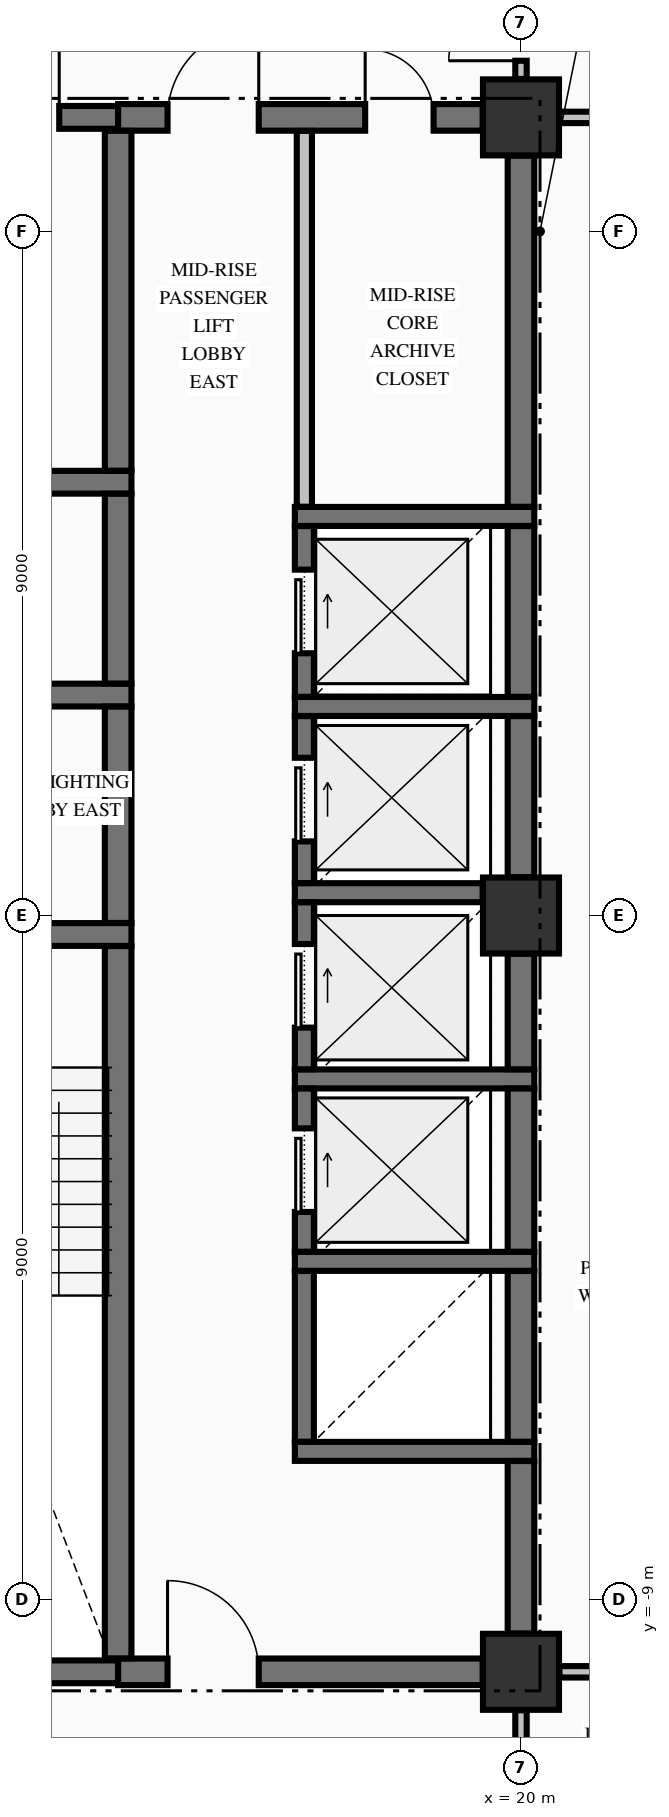
"""IFC4 building model, lengths in metres.
Left out: names, types, materials, properties, quantities, classifications, styles, units other than length and angle.
Written with IfcOpenShell. Run it as: python <this file> out.ifc"""

import sys

from ifc_helpers import new_model, si_unit, direction, frame, frame_2d, origin, origin_2d, place, context, subcontext, project, spatial, rectangle, extrude, element, fill, save


model = new_model("IFC4")
c1 = context("Model", 3, precision=1e-05, world=origin(), true_north=direction((0.0, 1.0)))
c2 = subcontext(c1, "Body", "Model", "MODEL_VIEW")
j1 = project(units=[si_unit("LENGTHUNIT", "METRE"), si_unit("PLANEANGLEUNIT", "RADIAN")], contexts=[c1])
p1 = place(None, origin())
s1 = spatial("IfcSite", under=j1, at=p1, CompositionType="ELEMENT")
p2 = place(p1, origin())
s2 = spatial("IfcBuilding", under=s1, at=p2, CompositionType="ELEMENT")
p3 = place(p2, frame((0.0, 0.0, 149.91)))
s3 = spatial("IfcBuildingStorey", under=s2, at=p3, CompositionType="ELEMENT", Elevation=149.91)
for number, where, z_axis, x_axis in (
    (1, (20.0, -9.95, -0.25), (0.0, 0.0, 1.0), (1.0, 0.0, 0.0)),
    (2, (20.0, 10.5, -0.25), (0.0, 0.0, 1.0), (1.0, 0.0, 0.0)),
    (3, (20.0, 0.0, -0.25), (0.0, 0.0, 1.0), (1.0, 0.0, 0.0)),
):
    element("IfcColumn", number, at=place(p3, frame(where, z_axis=z_axis, x_axis=x_axis)), inside=s3, PredefinedType="COLUMN", context=c2, shape_type="SweptSolid", body=[
        extrude(rectangle(XDim=1.0, YDim=1.0, at=origin_2d()), origin(), (0.0, 0.0, 1.0), 3.395),
    ])
p4 = place(p3, frame((11.504, -9.95, 0.0), z_axis=(0.0, 0.0, 1.0), x_axis=(1.0, 0.0, 0.0)))
e4 = element("IfcWall", 4, at=p4, inside=s3, PredefinedType="SHEAR", context=c2, shape_type="SweptSolid", body=[
    extrude(rectangle(XDim=3.196, YDim=0.3, at=frame_2d((1.598, 0.0))), origin(), (0.0, 0.0, 1.0), 3.145),
])
p5 = place(p3, frame((14.7, -9.95, 0.0), z_axis=(0.0, 0.0, 1.0), x_axis=(1.0, 0.0, 0.0)))
e5 = element("IfcWall", 5, at=p5, inside=s3, PredefinedType="SHEAR", context=c2, shape_type="SweptSolid", body=[
    extrude(rectangle(XDim=4.796, YDim=0.35, at=frame_2d((2.398, 0.0))), origin(), (0.0, 0.0, 1.0), 3.145),
])
p6 = place(p5, frame((0.65, 0.0, 0.0)))
e6 = element("IfcOpeningElement", 6, at=p6, cuts=e5, PredefinedType="OPENING", context=c2, shape_type="SweptSolid", body=[
    extrude(rectangle(XDim=1.2, YDim=2.15, at=frame_2d((0.6, 1.075))), frame((0.0, 0.185, 0.0), z_axis=(0.0, -1.0, 0.0), x_axis=(1.0, 0.0, 0.0)), (0.0, 0.0, 1.0), 0.37),
])
for number, where, z_axis, x_axis in (
    (7, (17.025, -7.05, 0.0), (0.0, 0.0, 1.0), (1.0, 0.0, 0.0)),
    (8, (17.025, -4.55, 0.0), (0.0, 0.0, 1.0), (1.0, 0.0, 0.0)),
    (9, (17.025, -2.15, 0.0), (0.0, 0.0, 1.0), (1.0, 0.0, 0.0)),
):
    element("IfcWall", number, at=place(p3, frame(where, z_axis=z_axis, x_axis=x_axis)), inside=s3, PredefinedType="SOLIDWALL", context=c2, shape_type="SweptSolid", body=[
        extrude(rectangle(XDim=3.15, YDim=0.25, at=frame_2d((1.575, 0.0))), origin(), (0.0, 0.0, 1.0), 3.145),
    ])
p7 = place(p3, frame((11.504, -0.25, 0.0), z_axis=(0.0, 0.0, 1.0), x_axis=(1.0, 0.0, 0.0)))
e10 = element("IfcWall", 10, at=p7, inside=s3, PredefinedType="SHEAR", context=c2, shape_type="SweptSolid", body=[
    extrude(rectangle(XDim=3.371, YDim=0.3, at=frame_2d((1.686, 0.0))), origin(), (0.0, 0.0, 1.0), 3.145),
])
p8 = place(p7, frame((1.096, 0.0, 0.0)))
e11 = element("IfcOpeningElement", 11, at=p8, cuts=e10, PredefinedType="OPENING", context=c2, shape_type="SweptSolid", body=[
    extrude(rectangle(XDim=1.1, YDim=2.15, at=frame_2d((0.55, 1.075))), frame((0.0, 0.16, 0.0), z_axis=(0.0, -1.0, 0.0), x_axis=(1.0, 0.0, 0.0)), (0.0, 0.0, 1.0), 0.32),
])
p9 = place(p3, frame((17.025, 0.3, 0.0), z_axis=(0.0, 0.0, 1.0), x_axis=(1.0, 0.0, 0.0)))
e12 = element("IfcWall", 12, at=p9, inside=s3, PredefinedType="SOLIDWALL", context=c2, shape_type="SweptSolid", body=[
    extrude(rectangle(XDim=2.471, YDim=0.25, at=frame_2d((1.236, 0.0))), origin(), (0.0, 0.0, 1.0), 3.145),
])
p10 = place(p3, frame((17.025, 2.75, 0.0), z_axis=(0.0, 0.0, 1.0), x_axis=(1.0, 0.0, 0.0)))
e13 = element("IfcWall", 13, at=p10, inside=s3, PredefinedType="SOLIDWALL", context=c2, shape_type="SweptSolid", body=[
    extrude(rectangle(XDim=3.15, YDim=0.25, at=frame_2d((1.575, 0.0))), origin(), (0.0, 0.0, 1.0), 3.145),
])
p11 = place(p3, frame((10.85, 2.9, 0.0), z_axis=(0.0, 0.0, 1.0), x_axis=(1.0, 0.0, 0.0)))
e14 = element("IfcWall", 14, at=p11, inside=s3, PredefinedType="SHEAR", context=c2, shape_type="SweptSolid", body=[
    extrude(rectangle(XDim=4.025, YDim=0.3, at=frame_2d((2.012, 0.0))), origin(), (0.0, 0.0, 1.0), 3.145),
])
p12 = place(p11, frame((0.85, 0.0, 0.0)))
e15 = element("IfcOpeningElement", 15, at=p12, cuts=e14, PredefinedType="OPENING", context=c2, shape_type="SweptSolid", body=[
    extrude(rectangle(XDim=1.1, YDim=2.2, at=frame_2d((0.55, 1.1))), frame((0.0, 0.16, 0.0), z_axis=(0.0, -1.0, 0.0), x_axis=(1.0, 0.0, 0.0)), (0.0, 0.0, 1.0), 0.32),
])
p13 = place(p3, frame((17.025, 5.25, 0.0), z_axis=(0.0, 0.0, 1.0), x_axis=(1.0, 0.0, 0.0)))
e16 = element("IfcWall", 16, at=p13, inside=s3, PredefinedType="SOLIDWALL", context=c2, shape_type="SweptSolid", body=[
    extrude(rectangle(XDim=3.15, YDim=0.25, at=frame_2d((1.575, 0.0))), origin(), (0.0, 0.0, 1.0), 3.145),
])
p14 = place(p3, frame((10.85, 5.7, 0.0), z_axis=(0.0, 0.0, 1.0), x_axis=(1.0, 0.0, 0.0)))
e17 = element("IfcWall", 17, at=p14, inside=s3, PredefinedType="SHEAR", context=c2, shape_type="SweptSolid", body=[
    extrude(rectangle(XDim=4.025, YDim=0.3, at=frame_2d((2.012, 0.0))), origin(), (0.0, 0.0, 1.0), 3.145),
])
p15 = place(p3, frame((11.504, 10.5, 0.0), z_axis=(0.0, 0.0, 1.0), x_axis=(1.0, 0.0, 0.0)))
e18 = element("IfcWall", 18, at=p15, inside=s3, PredefinedType="SHEAR", context=c2, shape_type="SweptSolid", body=[
    extrude(rectangle(XDim=3.196, YDim=0.3, at=frame_2d((1.598, 0.0))), origin(), (0.0, 0.0, 1.0), 3.145),
])
p16 = place(p15, frame((1.471, 0.0, 0.0)))
e19 = element("IfcOpeningElement", 19, at=p16, cuts=e18, PredefinedType="OPENING", context=c2, shape_type="SweptSolid", body=[
    extrude(rectangle(XDim=0.95, YDim=2.15, at=frame_2d((0.475, 1.075))), frame((0.0, 0.16, 0.0), z_axis=(0.0, -1.0, 0.0), x_axis=(1.0, 0.0, 0.0)), (0.0, 0.0, 1.0), 0.32),
])
p17 = place(p3, frame((14.7, 10.5, 0.0), z_axis=(0.0, 0.0, 1.0), x_axis=(1.0, 0.0, 0.0)))
e20 = element("IfcWall", 20, at=p17, inside=s3, PredefinedType="SHEAR", context=c2, shape_type="SweptSolid", body=[
    extrude(rectangle(XDim=4.796, YDim=0.35, at=frame_2d((2.398, 0.0))), origin(), (0.0, 0.0, 1.0), 3.145),
])
p18 = place(p17, frame((0.65, 0.0, 0.0)))
e21 = element("IfcOpeningElement", 21, at=p18, cuts=e20, PredefinedType="OPENING", context=c2, shape_type="SweptSolid", body=[
    extrude(rectangle(XDim=1.2, YDim=2.15, at=frame_2d((0.6, 1.075))), frame((0.0, 0.185, 0.0), z_axis=(0.0, -1.0, 0.0), x_axis=(1.0, 0.0, 0.0)), (0.0, 0.0, 1.0), 0.37),
])
p19 = place(p17, frame((3.25, 0.0, 0.0)))
e22 = element("IfcOpeningElement", 22, at=p19, cuts=e20, PredefinedType="OPENING", context=c2, shape_type="SweptSolid", body=[
    extrude(rectangle(XDim=0.9, YDim=2.15, at=frame_2d((0.45, 1.075))), frame((0.0, 0.185, 0.0), z_axis=(0.0, -1.0, 0.0), x_axis=(1.0, 0.0, 0.0)), (0.0, 0.0, 1.0), 0.37),
])
p20 = place(p3, frame((20.506, -9.95, 0.0), z_axis=(0.0, 0.0, 1.0), x_axis=(1.0, 0.0, 0.0)))
e23 = element("IfcWall", 23, at=p20, inside=s3, PredefinedType="PARTITIONING", context=c2, shape_type="SweptSolid", body=[
    extrude(rectangle(XDim=2.329, YDim=0.15, at=frame_2d((1.165, 0.0))), origin(), (0.0, 0.0, 1.0), 3.145),
])
p21 = place(p20, frame((0.494, 0.0, 0.0)))
e24 = element("IfcOpeningElement", 24, at=p21, cuts=e23, PredefinedType="OPENING", context=c2, shape_type="SweptSolid", body=[
    extrude(rectangle(XDim=1.0, YDim=2.15, at=frame_2d((0.5, 1.075))), frame((0.0, 0.085, 0.0), z_axis=(0.0, -1.0, 0.0), x_axis=(1.0, 0.0, 0.0)), (0.0, 0.0, 1.0), 0.17),
])
p22 = place(p3, frame((20.506, 10.5, 0.0), z_axis=(0.0, 0.0, 1.0), x_axis=(1.0, 0.0, 0.0)))
e25 = element("IfcWall", 25, at=p22, inside=s3, PredefinedType="PARTITIONING", context=c2, shape_type="SweptSolid", body=[
    extrude(rectangle(XDim=2.329, YDim=0.15, at=frame_2d((1.165, 0.0))), origin(), (0.0, 0.0, 1.0), 3.145),
])
p23 = place(p22, frame((0.494, 0.0, 0.0)))
e26 = element("IfcOpeningElement", 26, at=p23, cuts=e25, PredefinedType="OPENING", context=c2, shape_type="SweptSolid", body=[
    extrude(rectangle(XDim=1.0, YDim=2.15, at=frame_2d((0.5, 1.075))), frame((0.0, 0.085, 0.0), z_axis=(0.0, -1.0, 0.0), x_axis=(1.0, 0.0, 0.0)), (0.0, 0.0, 1.0), 0.17),
])
p24 = place(p3, frame((14.7, -9.773, 0.0), z_axis=(0.0, 0.0, 1.0), x_axis=(0.0, 1.0, 0.0)))
e27 = element("IfcWall", 27, at=p24, inside=s3, PredefinedType="SHEAR", context=c2, shape_type="SweptSolid", body=[
    extrude(rectangle(XDim=9.371, YDim=0.35, at=frame_2d((4.686, 0.0))), origin(), (0.0, 0.0, 1.0), 3.145),
])
p25 = place(p3, frame((14.7, -0.098, 0.0), z_axis=(0.0, 0.0, 1.0), x_axis=(0.0, 1.0, 0.0)))
e28 = element("IfcWall", 28, at=p25, inside=s3, PredefinedType="SHEAR", context=c2, shape_type="SweptSolid", body=[
    extrude(rectangle(XDim=2.846, YDim=0.35, at=frame_2d((1.423, 0.0))), origin(), (0.0, 0.0, 1.0), 3.145),
])
p26 = place(p3, frame((14.7, 3.052, 0.0), z_axis=(0.0, 0.0, 1.0), x_axis=(0.0, 1.0, 0.0)))
e29 = element("IfcWall", 29, at=p26, inside=s3, PredefinedType="SHEAR", context=c2, shape_type="SweptSolid", body=[
    extrude(rectangle(XDim=2.496, YDim=0.35, at=frame_2d((1.248, 0.0))), origin(), (0.0, 0.0, 1.0), 3.145),
])
p27 = place(p3, frame((14.7, 5.852, 0.0), z_axis=(0.0, 0.0, 1.0), x_axis=(0.0, 1.0, 0.0)))
e30 = element("IfcWall", 30, at=p27, inside=s3, PredefinedType="SHEAR", context=c2, shape_type="SweptSolid", body=[
    extrude(rectangle(XDim=4.471, YDim=0.35, at=frame_2d((2.235, 0.0))), origin(), (0.0, 0.0, 1.0), 3.145),
])
p28 = place(p3, frame((17.15, -6.923, 0.0), z_axis=(0.0, 0.0, 1.0), x_axis=(0.0, 1.0, 0.0)))
e31 = element("IfcWall", 31, at=p28, inside=s3, PredefinedType="SOLIDWALL", context=c2, shape_type="SweptSolid", body=[
    extrude(rectangle(XDim=2.246, YDim=0.25, at=frame_2d((1.123, 0.0))), origin(), (0.0, 0.0, 1.0), 3.145),
])
p29 = place(p3, frame((17.15, -4.423, 0.0), z_axis=(0.0, 0.0, 1.0), x_axis=(0.0, 1.0, 0.0)))
e32 = element("IfcWall", 32, at=p29, inside=s3, PredefinedType="SOLIDWALL", context=c2, shape_type="SweptSolid", body=[
    extrude(rectangle(XDim=2.146, YDim=0.25, at=frame_2d((1.073, 0.0))), origin(), (0.0, 0.0, 1.0), 3.145),
])
p30 = place(p29, frame((0.523, 0.0, 0.0)))
e33 = element("IfcOpeningElement", 33, at=p30, cuts=e32, PredefinedType="OPENING", context=c2, shape_type="SweptSolid", body=[
    extrude(rectangle(XDim=1.1, YDim=2.2, at=frame_2d((0.55, 1.1))), frame((0.0, 0.135, 0.0), z_axis=(0.0, -1.0, 0.0), x_axis=(1.0, 0.0, 0.0)), (0.0, 0.0, 1.0), 0.27),
])
p31 = place(p3, frame((17.15, -2.023, 0.0), z_axis=(0.0, 0.0, 1.0), x_axis=(0.0, 1.0, 0.0)))
e34 = element("IfcWall", 34, at=p31, inside=s3, PredefinedType="SOLIDWALL", context=c2, shape_type="SweptSolid", body=[
    extrude(rectangle(XDim=2.196, YDim=0.25, at=frame_2d((1.098, 0.0))), origin(), (0.0, 0.0, 1.0), 3.145),
])
p32 = place(p31, frame((0.548, 0.0, 0.0)))
e35 = element("IfcOpeningElement", 35, at=p32, cuts=e34, PredefinedType="OPENING", context=c2, shape_type="SweptSolid", body=[
    extrude(rectangle(XDim=1.1, YDim=2.2, at=frame_2d((0.55, 1.1))), frame((0.0, 0.135, 0.0), z_axis=(0.0, -1.0, 0.0), x_axis=(1.0, 0.0, 0.0)), (0.0, 0.0, 1.0), 0.27),
])
p33 = place(p3, frame((17.15, 0.427, 0.0), z_axis=(0.0, 0.0, 1.0), x_axis=(0.0, 1.0, 0.0)))
e36 = element("IfcWall", 36, at=p33, inside=s3, PredefinedType="SOLIDWALL", context=c2, shape_type="SweptSolid", body=[
    extrude(rectangle(XDim=2.196, YDim=0.25, at=frame_2d((1.098, 0.0))), origin(), (0.0, 0.0, 1.0), 3.145),
])
p34 = place(p33, frame((0.548, 0.0, 0.0)))
e37 = element("IfcOpeningElement", 37, at=p34, cuts=e36, PredefinedType="OPENING", context=c2, shape_type="SweptSolid", body=[
    extrude(rectangle(XDim=1.1, YDim=2.2, at=frame_2d((0.55, 1.1))), frame((0.0, 0.135, 0.0), z_axis=(0.0, -1.0, 0.0), x_axis=(1.0, 0.0, 0.0)), (0.0, 0.0, 1.0), 0.27),
])
p35 = place(p3, frame((17.15, 2.877, 0.0), z_axis=(0.0, 0.0, 1.0), x_axis=(0.0, 1.0, 0.0)))
e38 = element("IfcWall", 38, at=p35, inside=s3, PredefinedType="SOLIDWALL", context=c2, shape_type="SweptSolid", body=[
    extrude(rectangle(XDim=2.246, YDim=0.25, at=frame_2d((1.123, 0.0))), origin(), (0.0, 0.0, 1.0), 3.145),
])
p36 = place(p35, frame((0.573, 0.0, 0.0)))
e39 = element("IfcOpeningElement", 39, at=p36, cuts=e38, PredefinedType="OPENING", context=c2, shape_type="SweptSolid", body=[
    extrude(rectangle(XDim=1.1, YDim=2.2, at=frame_2d((0.55, 1.1))), frame((0.0, 0.135, 0.0), z_axis=(0.0, -1.0, 0.0), x_axis=(1.0, 0.0, 0.0)), (0.0, 0.0, 1.0), 0.27),
])
p37 = place(p3, frame((20.0, -9.446, 0.0), z_axis=(0.0, 0.0, 1.0), x_axis=(0.0, 1.0, 0.0)))
e40 = element("IfcWall", 40, at=p37, inside=s3, PredefinedType="SHEAR", context=c2, shape_type="SweptSolid", body=[
    extrude(rectangle(XDim=2.269, YDim=0.35, at=frame_2d((1.135, 0.0))), origin(), (0.0, 0.0, 1.0), 3.145),
])
p38 = place(p3, frame((20.0, -6.923, 0.0), z_axis=(0.0, 0.0, 1.0), x_axis=(0.0, 1.0, 0.0)))
e41 = element("IfcWall", 41, at=p38, inside=s3, PredefinedType="SHEAR", context=c2, shape_type="SweptSolid", body=[
    extrude(rectangle(XDim=2.246, YDim=0.35, at=frame_2d((1.123, 0.0))), origin(), (0.0, 0.0, 1.0), 3.145),
])
p39 = place(p3, frame((20.0, -4.423, 0.0), z_axis=(0.0, 0.0, 1.0), x_axis=(0.0, 1.0, 0.0)))
e42 = element("IfcWall", 42, at=p39, inside=s3, PredefinedType="SHEAR", context=c2, shape_type="SweptSolid", body=[
    extrude(rectangle(XDim=2.146, YDim=0.35, at=frame_2d((1.073, 0.0))), origin(), (0.0, 0.0, 1.0), 3.145),
])
p40 = place(p3, frame((20.0, -2.023, 0.0), z_axis=(0.0, 0.0, 1.0), x_axis=(0.0, 1.0, 0.0)))
e43 = element("IfcWall", 43, at=p40, inside=s3, PredefinedType="SHEAR", context=c2, shape_type="SweptSolid", body=[
    extrude(rectangle(XDim=1.519, YDim=0.35, at=frame_2d((0.76, 0.0))), origin(), (0.0, 0.0, 1.0), 3.145),
])
p41 = place(p3, frame((20.0, 0.504, 0.0), z_axis=(0.0, 0.0, 1.0), x_axis=(0.0, 1.0, 0.0)))
e44 = element("IfcWall", 44, at=p41, inside=s3, PredefinedType="SHEAR", context=c2, shape_type="SweptSolid", body=[
    extrude(rectangle(XDim=2.119, YDim=0.35, at=frame_2d((1.06, 0.0))), origin(), (0.0, 0.0, 1.0), 3.145),
])
p42 = place(p3, frame((20.0, 2.877, 0.0), z_axis=(0.0, 0.0, 1.0), x_axis=(0.0, 1.0, 0.0)))
e45 = element("IfcWall", 45, at=p42, inside=s3, PredefinedType="SHEAR", context=c2, shape_type="SweptSolid", body=[
    extrude(rectangle(XDim=2.246, YDim=0.35, at=frame_2d((1.123, 0.0))), origin(), (0.0, 0.0, 1.0), 3.145),
])
p43 = place(p3, frame((20.0, 5.377, 0.0), z_axis=(0.0, 0.0, 1.0), x_axis=(0.0, 1.0, 0.0)))
e46 = element("IfcWall", 46, at=p43, inside=s3, PredefinedType="SHEAR", context=c2, shape_type="SweptSolid", body=[
    extrude(rectangle(XDim=4.619, YDim=0.35, at=frame_2d((2.31, 0.0))), origin(), (0.0, 0.0, 1.0), 3.145),
])
p44 = place(p3, frame((17.15, 5.378, 0.0), z_axis=(0.0, 0.0, 1.0), x_axis=(0.0, 1.0, 0.0)))
e47 = element("IfcWall", 47, at=p44, inside=s3, PredefinedType="PARTITIONING", context=c2, shape_type="SweptSolid", body=[
    extrude(rectangle(XDim=4.944, YDim=0.2, at=frame_2d((2.472, 0.0))), origin(), (0.0, 0.0, 1.0), 3.145),
])
p45 = place(p3, frame((20.0, -13.022, 0.0), z_axis=(0.0, 0.0, 1.0), x_axis=(0.0, 1.0, 0.0)))
e48 = element("IfcWall", 48, at=p45, inside=s3, PredefinedType="PARTITIONING", context=c2, shape_type="SweptSolid", body=[
    extrude(rectangle(XDim=2.566, YDim=0.15, at=frame_2d((1.283, 0.0))), origin(), (0.0, 0.0, 1.0), 2.635),
])
p46 = place(p45, frame((1.027, 0.0, 0.0)))
e49 = element("IfcOpeningElement", 49, at=p46, cuts=e48, PredefinedType="OPENING", context=c2, shape_type="SweptSolid", body=[
    extrude(rectangle(XDim=0.95, YDim=2.15, at=frame_2d((0.475, 1.075))), frame((0.0, 0.085, 0.0), z_axis=(0.0, -1.0, 0.0), x_axis=(1.0, 0.0, 0.0)), (0.0, 0.0, 1.0), 0.17),
])
p47 = place(p3, frame((20.0, 11.006, 0.0), z_axis=(0.0, 0.0, 1.0), x_axis=(0.0, 1.0, 0.0)))
e50 = element("IfcWall", 50, at=p47, inside=s3, PredefinedType="PARTITIONING", context=c2, shape_type="SweptSolid", body=[
    extrude(rectangle(XDim=1.866, YDim=0.15, at=frame_2d((0.933, 0.0))), origin(), (0.0, 0.0, 1.0), 2.635),
])
p48 = place(p47, frame((0.239, 0.0, 0.0)))
e51 = element("IfcOpeningElement", 51, at=p48, cuts=e50, PredefinedType="OPENING", context=c2, shape_type="SweptSolid", body=[
    extrude(rectangle(XDim=0.95, YDim=2.15, at=frame_2d((0.475, 1.075))), frame((0.0, 0.085, 0.0), z_axis=(0.0, -1.0, 0.0), x_axis=(1.0, 0.0, 0.0)), (0.0, 0.0, 1.0), 0.17),
])
p49 = place(p16, origin())
e52 = element("IfcDoor", 52, at=p49, inside=s3, OperationType="SINGLE_SWING_RIGHT", PredefinedType="DOOR", context=c2, shape_type="SweptSolid", body=[
    extrude(rectangle(XDim=0.95, YDim=2.15, at=frame_2d((0.475, 1.075))), frame((0.0, 0.025, 0.0), z_axis=(0.0, -1.0, 0.0), x_axis=(1.0, 0.0, 0.0)), (0.0, 0.0, 1.0), 0.05),
])
fill(e19, e52)
p50 = place(p30, origin())
e53 = element("IfcDoor", 53, at=p50, inside=s3, OperationType="SLIDING_TO_RIGHT", PredefinedType="DOOR", context=c2, shape_type="SweptSolid", body=[
    extrude(rectangle(XDim=1.1, YDim=2.2, at=frame_2d((0.55, 1.1))), frame((0.0, 0.025, 0.0), z_axis=(0.0, -1.0, 0.0), x_axis=(1.0, 0.0, 0.0)), (0.0, 0.0, 1.0), 0.05),
])
fill(e33, e53)
p51 = place(p32, origin())
e54 = element("IfcDoor", 54, at=p51, inside=s3, OperationType="SLIDING_TO_RIGHT", PredefinedType="DOOR", context=c2, shape_type="SweptSolid", body=[
    extrude(rectangle(XDim=1.1, YDim=2.2, at=frame_2d((0.55, 1.1))), frame((0.0, 0.025, 0.0), z_axis=(0.0, -1.0, 0.0), x_axis=(1.0, 0.0, 0.0)), (0.0, 0.0, 1.0), 0.05),
])
fill(e35, e54)
p52 = place(p34, origin())
e55 = element("IfcDoor", 55, at=p52, inside=s3, OperationType="SLIDING_TO_RIGHT", PredefinedType="DOOR", context=c2, shape_type="SweptSolid", body=[
    extrude(rectangle(XDim=1.1, YDim=2.2, at=frame_2d((0.55, 1.1))), frame((0.0, 0.025, 0.0), z_axis=(0.0, -1.0, 0.0), x_axis=(1.0, 0.0, 0.0)), (0.0, 0.0, 1.0), 0.05),
])
fill(e37, e55)
p53 = place(p36, origin())
e56 = element("IfcDoor", 56, at=p53, inside=s3, OperationType="SLIDING_TO_RIGHT", PredefinedType="DOOR", context=c2, shape_type="SweptSolid", body=[
    extrude(rectangle(XDim=1.1, YDim=2.2, at=frame_2d((0.55, 1.1))), frame((0.0, 0.025, 0.0), z_axis=(0.0, -1.0, 0.0), x_axis=(1.0, 0.0, 0.0)), (0.0, 0.0, 1.0), 0.05),
])
fill(e39, e56)
p54 = place(p6, origin())
e57 = element("IfcDoor", 57, at=p54, inside=s3, OperationType="SINGLE_SWING_LEFT", PredefinedType="DOOR", context=c2, shape_type="SweptSolid", body=[
    extrude(rectangle(XDim=1.2, YDim=2.15, at=frame_2d((0.6, 1.075))), frame((0.0, 0.025, 0.0), z_axis=(0.0, -1.0, 0.0), x_axis=(1.0, 0.0, 0.0)), (0.0, 0.0, 1.0), 0.05),
])
fill(e6, e57)
p55 = place(p18, origin())
e58 = element("IfcDoor", 58, at=p55, inside=s3, OperationType="SINGLE_SWING_RIGHT", PredefinedType="DOOR", context=c2, shape_type="SweptSolid", body=[
    extrude(rectangle(XDim=1.2, YDim=2.15, at=frame_2d((0.6, 1.075))), frame((0.0, 0.025, 0.0), z_axis=(0.0, -1.0, 0.0), x_axis=(1.0, 0.0, 0.0)), (0.0, 0.0, 1.0), 0.05),
])
fill(e21, e58)
p56 = place(p19, origin())
e59 = element("IfcDoor", 59, at=p56, inside=s3, OperationType="SINGLE_SWING_LEFT", PredefinedType="DOOR", context=c2, shape_type="SweptSolid", body=[
    extrude(rectangle(XDim=0.9, YDim=2.15, at=frame_2d((0.45, 1.075))), frame((0.0, 0.025, 0.0), z_axis=(0.0, -1.0, 0.0), x_axis=(1.0, 0.0, 0.0)), (0.0, 0.0, 1.0), 0.05),
])
fill(e22, e59)
p57 = place(p48, origin())
e60 = element("IfcDoor", 60, at=p57, inside=s3, OperationType="SINGLE_SWING_LEFT", PredefinedType="DOOR", context=c2, shape_type="SweptSolid", body=[
    extrude(rectangle(XDim=0.95, YDim=2.15, at=frame_2d((0.475, 1.075))), frame((0.0, 0.025, 0.0), z_axis=(0.0, -1.0, 0.0), x_axis=(1.0, 0.0, 0.0)), (0.0, 0.0, 1.0), 0.05),
])
fill(e51, e60)
save(model, sys.argv[1])
